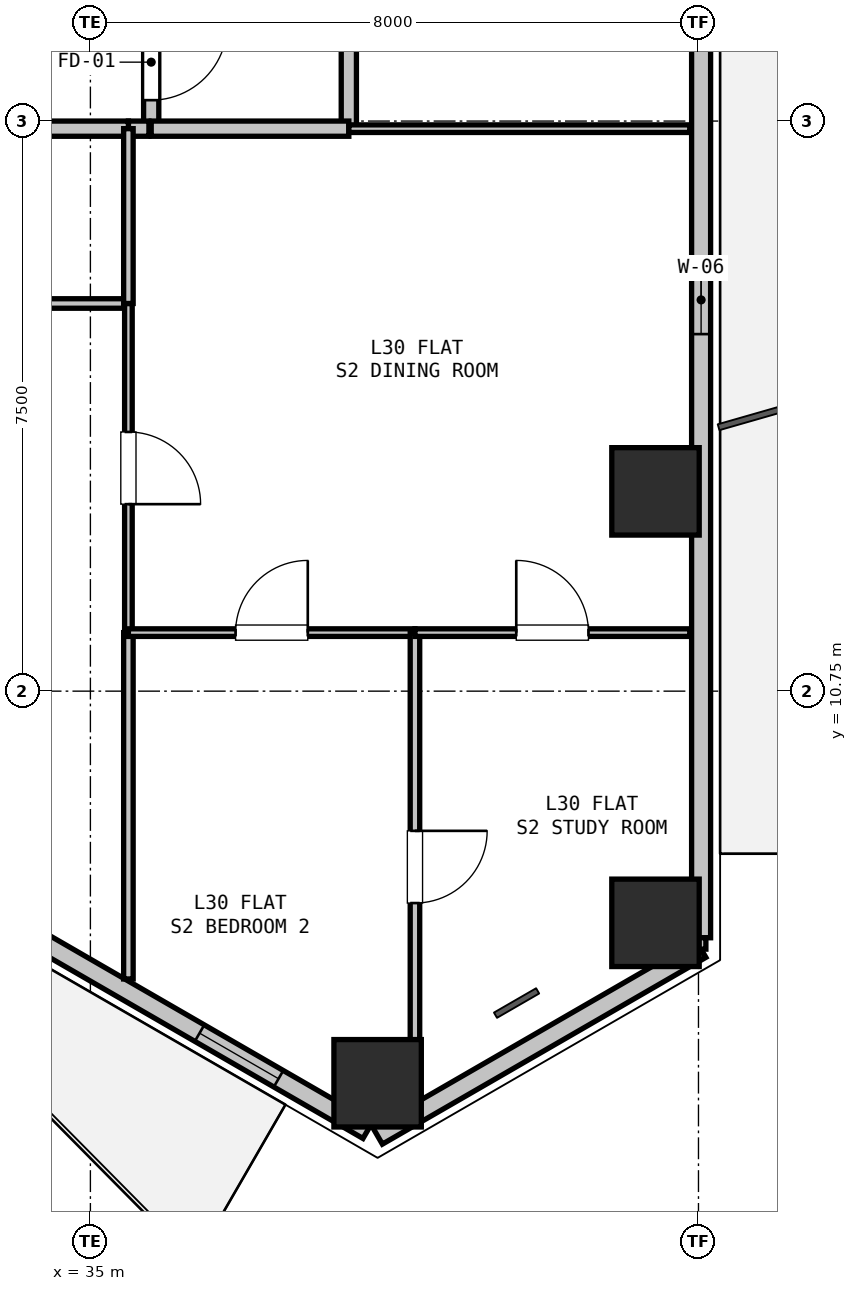
"""IFC4 building model, lengths in metres.
Left out: names, types, materials, properties, quantities, classifications, styles, units other than length and angle.
Written with IfcOpenShell. Run it as: python <this file> out.ifc"""

import sys

from ifc_helpers import new_model, si_unit, direction, frame, frame_2d, origin, origin_2d, place, context, subcontext, project, spatial, rectangle, hollow_rectangle, extrude, element, fill, save


model = new_model("IFC4")
c1 = context("Model", 3, precision=1e-05, world=origin(), true_north=direction((0.0, 1.0)))
c2 = subcontext(c1, "Body", "Model", "MODEL_VIEW")
j1 = project(units=[si_unit("LENGTHUNIT", "METRE"), si_unit("PLANEANGLEUNIT", "RADIAN")], contexts=[c1])
p1 = place(None, origin())
s1 = spatial("IfcSite", under=j1, at=p1, CompositionType="ELEMENT")
p2 = place(p1, origin())
s2 = spatial("IfcBuilding", under=s1, at=p2, CompositionType="ELEMENT")
p3 = place(p2, frame((0.0, 0.0, 109.8)))
s3 = spatial("IfcBuildingStorey", under=s2, at=p3, CompositionType="ELEMENT", Elevation=109.8)
for number, where, z_axis, x_axis in (
    (1, (42.435, 13.378, 0.0), (0.0, 0.0, 1.0), (1.0, 0.0, 0.0)),
    (2, (42.435, 7.702, 0.0), (0.0, 0.0, 1.0), (1.0, 0.0, 0.0)),
    (3, (38.779, 5.591, 0.0), (0.0, 0.0, 1.0), (1.0, 0.0, 0.0)),
):
    element("IfcColumn", number, at=place(p3, frame(where, z_axis=z_axis, x_axis=x_axis)), inside=s3, PredefinedType="COLUMN", context=c2, shape_type="SweptSolid", body=[
        extrude(hollow_rectangle(XDim=1.15, YDim=1.15, WallThickness=0.032, at=origin_2d()), origin(), (0.0, 0.0, 1.0), 3.3),
    ])
p4 = place(p3, frame((43.035, 7.356, 0.0), z_axis=(0.0, 0.0, 1.0), x_axis=(-0.866011848704, -0.500023477353, 0.0)))
e4 = element("IfcWall", 4, at=p4, inside=s3, PredefinedType="SOLIDWALL", context=c2, shape_type="SweptSolid", body=[
    extrude(rectangle(XDim=4.914, YDim=0.25, at=frame_2d((2.457, 0.0))), origin(), (0.0, 0.0, 1.0), 2.67),
])
p5 = place(p3, frame((43.035, 19.435, 0.0), z_axis=(0.0, 0.0, 1.0), x_axis=(0.0, -1.0, 0.0)))
e5 = element("IfcWall", 5, at=p5, inside=s3, PredefinedType="SOLIDWALL", context=c2, shape_type="SweptSolid", body=[
    extrude(rectangle(XDim=11.93, YDim=0.25, at=frame_2d((5.965, 0.0))), origin(), (0.0, 0.0, 1.0), 2.67),
])
p6 = place(p5, frame((3.088, 0.0, 0.9)))
e6 = element("IfcOpeningElement", 6, at=p6, cuts=e5, PredefinedType="OPENING", context=c2, shape_type="SweptSolid", body=[
    extrude(rectangle(XDim=0.9, YDim=1.4, at=frame_2d((0.45, 0.7))), frame((0.0, 0.135, 0.0), z_axis=(0.0, -1.0, 0.0), x_axis=(1.0, 0.0, 0.0)), (0.0, 0.0, 1.0), 0.27),
])
p7 = place(p3, frame((38.649, 4.973, 0.0), z_axis=(0.0, 0.0, 1.0), x_axis=(-0.866023023012, 0.500004123596, 0.0)))
e7 = element("IfcWall", 7, at=p7, inside=s3, PredefinedType="SOLIDWALL", context=c2, shape_type="SweptSolid", body=[
    extrude(rectangle(XDim=11.93, YDim=0.25, at=frame_2d((5.965, 0.0))), origin(), (0.0, 0.0, 1.0), 2.67),
])
p8 = place(p7, frame((7.616, 0.0, 0.0)))
e8 = element("IfcOpeningElement", 8, at=p8, cuts=e7, PredefinedType="OPENING", context=c2, shape_type="SweptSolid", body=[
    extrude(rectangle(XDim=1.0, YDim=2.1, at=frame_2d((0.5, 1.05))), frame((0.0, 0.135, 0.0), z_axis=(0.0, -1.0, 0.0), x_axis=(1.0, 0.0, 0.0)), (0.0, 0.0, 1.0), 0.27),
])
p9 = place(p7, frame((1.355, 0.0, 0.9)))
e9 = element("IfcOpeningElement", 9, at=p9, cuts=e7, PredefinedType="OPENING", context=c2, shape_type="SweptSolid", body=[
    extrude(rectangle(XDim=1.2, YDim=1.4, at=frame_2d((0.6, 0.7))), frame((0.0, 0.135, 0.0), z_axis=(0.0, -1.0, 0.0), x_axis=(1.0, 0.0, 0.0)), (0.0, 0.0, 1.0), 0.27),
])
p10 = place(p3, frame((35.8, 19.9, 0.0), z_axis=(0.0, 0.0, 1.0), x_axis=(0.0, -1.0, 0.0)))
e10 = element("IfcWall", 10, at=p10, inside=s3, PredefinedType="PARTITIONING", context=c2, shape_type="SweptSolid", body=[
    extrude(rectangle(XDim=1.75, YDim=0.2, at=frame_2d((0.875, 0.0))), origin(), (0.0, 0.0, 1.0), 3.05),
])
p11 = place(p10, frame((0.375, 0.0, 0.0)))
e11 = element("IfcOpeningElement", 11, at=p11, cuts=e10, PredefinedType="OPENING", context=c2, shape_type="SweptSolid", body=[
    extrude(rectangle(XDim=1.0, YDim=2.15, at=frame_2d((0.5, 1.075))), frame((0.0, 0.11, 0.0), z_axis=(0.0, -1.0, 0.0), x_axis=(1.0, 0.0, 0.0)), (0.0, 0.0, 1.0), 0.22),
])
p12 = place(p3, frame((35.77, 18.15, 0.0), z_axis=(0.0, 0.0, 1.0), x_axis=(-1.0, 0.0, 0.0)))
e12 = element("IfcWall", 12, at=p12, inside=s3, PredefinedType="PARTITIONING", context=c2, shape_type="SweptSolid", body=[
    extrude(rectangle(XDim=0.27, YDim=0.2, at=frame_2d((0.135, 0.0))), origin(), (0.0, 0.0, 1.0), 3.05),
])
p13 = place(p3, frame((35.5, 18.15, 0.0), z_axis=(0.0, 0.0, 1.0), x_axis=(-1.0, 0.0, 0.0)))
e13 = element("IfcWall", 13, at=p13, inside=s3, PredefinedType="PARTITIONING", context=c2, shape_type="SweptSolid", body=[
    extrude(rectangle(XDim=4.5, YDim=0.2, at=frame_2d((2.25, 0.0))), origin(), (0.0, 0.0, 1.0), 3.05),
])
p14 = place(p3, frame((38.4, 19.9, 0.0), z_axis=(0.0, 0.0, 1.0), x_axis=(0.0, -1.0, 0.0)))
e14 = element("IfcWall", 14, at=p14, inside=s3, PredefinedType="PARTITIONING", context=c2, shape_type="SweptSolid", body=[
    extrude(rectangle(XDim=1.75, YDim=0.2, at=frame_2d((0.875, 0.0))), origin(), (0.0, 0.0, 1.0), 3.05),
])
p15 = place(p3, frame((38.4, 18.15, 0.0), z_axis=(0.0, 0.0, 1.0), x_axis=(-1.0, 0.0, 0.0)))
e15 = element("IfcWall", 15, at=p15, inside=s3, PredefinedType="PARTITIONING", context=c2, shape_type="SweptSolid", body=[
    extrude(rectangle(XDim=2.6, YDim=0.2, at=frame_2d((1.3, 0.0))), origin(), (0.0, 0.0, 1.0), 2.423),
])
p16 = place(p3, frame((31.0, 15.85, 0.0), z_axis=(0.0, 0.0, 1.0), x_axis=(1.0, 0.0, 0.0)))
e16 = element("IfcWall", 16, at=p16, inside=s3, PredefinedType="PARTITIONING", context=c2, shape_type="SweptSolid", body=[
    extrude(rectangle(XDim=4.5, YDim=0.125, at=frame_2d((2.25, 0.0))), origin(), (0.0, 0.0, 1.0), 3.05),
])
p17 = place(p3, frame((35.5, 15.85, 0.0), z_axis=(0.0, 0.0, 1.0), x_axis=(0.0, -1.0, 0.0)))
e17 = element("IfcWall", 17, at=p17, inside=s3, PredefinedType="PARTITIONING", context=c2, shape_type="SweptSolid", body=[
    extrude(rectangle(XDim=4.33, YDim=0.1, at=frame_2d((2.165, 0.0))), origin(), (0.0, 0.0, 1.0), 3.05),
])
p18 = place(p17, frame((1.69, 0.0, 0.0)))
e18 = element("IfcOpeningElement", 18, at=p18, cuts=e17, PredefinedType="OPENING", context=c2, shape_type="SweptSolid", body=[
    extrude(rectangle(XDim=0.95, YDim=2.1, at=frame_2d((0.475, 1.05))), frame((0.0, 0.06, 0.0), z_axis=(0.0, -1.0, 0.0), x_axis=(1.0, 0.0, 0.0)), (0.0, 0.0, 1.0), 0.12),
])
p19 = place(p3, frame((35.5, 11.52, 0.0), z_axis=(0.0, 0.0, 1.0), x_axis=(0.0, -1.0, 0.0)))
e19 = element("IfcWall", 19, at=p19, inside=s3, PredefinedType="PARTITIONING", context=c2, shape_type="SweptSolid", body=[
    extrude(rectangle(XDim=4.557, YDim=0.125, at=frame_2d((2.278, 0.0))), origin(), (0.0, 0.0, 1.0), 2.714),
])
p20 = place(p3, frame((35.5, 11.52, 0.0), z_axis=(0.0, 0.0, 1.0), x_axis=(1.0, 0.0, 0.0)))
e20 = element("IfcWall", 20, at=p20, inside=s3, PredefinedType="PARTITIONING", context=c2, shape_type="SweptSolid", body=[
    extrude(rectangle(XDim=3.77, YDim=0.1, at=frame_2d((1.885, 0.0))), origin(), (0.0, 0.0, 1.0), 3.05),
])
p21 = place(p20, frame((1.41, 0.0, 0.0)))
e21 = element("IfcOpeningElement", 21, at=p21, cuts=e20, PredefinedType="OPENING", context=c2, shape_type="SweptSolid", body=[
    extrude(rectangle(XDim=0.95, YDim=2.1, at=frame_2d((0.475, 1.05))), frame((0.0, 0.06, 0.0), z_axis=(0.0, -1.0, 0.0), x_axis=(1.0, 0.0, 0.0)), (0.0, 0.0, 1.0), 0.12),
])
p22 = place(p3, frame((39.27, 11.52, 0.0), z_axis=(0.0, 0.0, 1.0), x_axis=(0.0, -1.0, 0.0)))
e22 = element("IfcWall", 22, at=p22, inside=s3, PredefinedType="PARTITIONING", context=c2, shape_type="SweptSolid", body=[
    extrude(rectangle(XDim=6.166, YDim=0.125, at=frame_2d((3.083, 0.0))), origin(), (0.0, 0.0, 1.0), 2.714),
])
p23 = place(p22, frame((2.608, 0.0, 0.0)))
e23 = element("IfcOpeningElement", 23, at=p23, cuts=e22, PredefinedType="OPENING", context=c2, shape_type="SweptSolid", body=[
    extrude(rectangle(XDim=0.95, YDim=2.1, at=frame_2d((0.475, 1.05))), frame((0.0, 0.073, 0.0), z_axis=(0.0, -1.0, 0.0), x_axis=(1.0, 0.0, 0.0)), (0.0, 0.0, 1.0), 0.145),
])
p24 = place(p3, frame((39.27, 11.52, 0.0), z_axis=(0.0, 0.0, 1.0), x_axis=(1.0, 0.0, 0.0)))
e24 = element("IfcWall", 24, at=p24, inside=s3, PredefinedType="PARTITIONING", context=c2, shape_type="SweptSolid", body=[
    extrude(rectangle(XDim=3.615, YDim=0.1, at=frame_2d((1.808, 0.0))), origin(), (0.0, 0.0, 1.0), 2.423),
])
p25 = place(p24, frame((1.333, 0.0, 0.0)))
e25 = element("IfcOpeningElement", 25, at=p25, cuts=e24, PredefinedType="OPENING", context=c2, shape_type="SweptSolid", body=[
    extrude(rectangle(XDim=0.95, YDim=2.1, at=frame_2d((0.475, 1.05))), frame((0.0, 0.06, 0.0), z_axis=(0.0, -1.0, 0.0), x_axis=(1.0, 0.0, 0.0)), (0.0, 0.0, 1.0), 0.12),
])
p26 = place(p3, frame((43.035, 7.506, 0.0), z_axis=(0.0, 0.0, 1.0), x_axis=(0.0, -1.0, 0.0)))
e26 = element("IfcWall", 26, at=p26, inside=s3, PredefinedType="PARTITIONING", context=c2, shape_type="SweptSolid", body=[
    extrude(rectangle(XDim=0.15, YDim=0.125, at=frame_2d((0.075, 0.0))), origin(), (0.0, 0.0, 1.0), 3.05),
])
p27 = place(p3, frame((38.4, 18.15, 0.0), z_axis=(0.0, 0.0, 1.0), x_axis=(1.0, 0.0, 0.0)))
e27 = element("IfcWall", 27, at=p27, inside=s3, PredefinedType="PARTITIONING", context=c2, shape_type="SweptSolid", body=[
    extrude(rectangle(XDim=4.486, YDim=0.1, at=frame_2d((2.243, 0.0))), origin(), (0.0, 0.0, 1.0), 2.365),
])
p28 = place(p3, frame((35.5, 15.85, 0.0), z_axis=(0.0, 0.0, 1.0), x_axis=(0.0, 1.0, 0.0)))
e28 = element("IfcWall", 28, at=p28, inside=s3, PredefinedType="PARTITIONING", context=c2, shape_type="SweptSolid", body=[
    extrude(rectangle(XDim=2.3, YDim=0.125, at=frame_2d((1.15, 0.0))), origin(), (0.0, 0.0, 1.0), 3.05),
])
p29 = place(p6, origin())
e29 = element("IfcWindow", 29, at=p29, inside=s3, PartitioningType="SINGLE_PANEL", PredefinedType="WINDOW", context=c2, shape_type="SweptSolid", body=[
    extrude(rectangle(XDim=0.9, YDim=1.4, at=frame_2d((0.45, 0.7))), frame((0.0, 0.03, 0.0), z_axis=(0.0, -1.0, 0.0), x_axis=(1.0, 0.0, 0.0)), (0.0, 0.0, 1.0), 0.06),
])
fill(e6, e29)
p30 = place(p9, origin())
e30 = element("IfcWindow", 30, at=p30, inside=s3, PartitioningType="SINGLE_PANEL", PredefinedType="WINDOW", context=c2, shape_type="SweptSolid", body=[
    extrude(rectangle(XDim=1.2, YDim=1.4, at=frame_2d((0.6, 0.7))), frame((0.0, 0.03, 0.0), z_axis=(0.0, -1.0, 0.0), x_axis=(1.0, 0.0, 0.0)), (0.0, 0.0, 1.0), 0.06),
])
fill(e9, e30)
p31 = place(p11, origin())
e31 = element("IfcDoor", 31, at=p31, inside=s3, OperationType="SINGLE_SWING_LEFT", PredefinedType="DOOR", context=c2, shape_type="SweptSolid", body=[
    extrude(rectangle(XDim=1.0, YDim=2.15, at=frame_2d((0.5, 1.075))), frame((0.0, 0.025, 0.0), z_axis=(0.0, -1.0, 0.0), x_axis=(1.0, 0.0, 0.0)), (0.0, 0.0, 1.0), 0.05),
])
fill(e11, e31)
p32 = place(p18, origin())
e32 = element("IfcDoor", 32, at=p32, inside=s3, OperationType="SINGLE_SWING_RIGHT", PredefinedType="DOOR", context=c2, shape_type="SweptSolid", body=[
    extrude(rectangle(XDim=0.95, YDim=2.1, at=frame_2d((0.475, 1.05))), frame((0.0, 0.025, 0.0), z_axis=(0.0, -1.0, 0.0), x_axis=(1.0, 0.0, 0.0)), (0.0, 0.0, 1.0), 0.05),
])
fill(e18, e32)
p33 = place(p23, origin())
e33 = element("IfcDoor", 33, at=p33, inside=s3, OperationType="SINGLE_SWING_LEFT", PredefinedType="DOOR", context=c2, shape_type="SweptSolid", body=[
    extrude(rectangle(XDim=0.95, YDim=2.1, at=frame_2d((0.475, 1.05))), frame((0.0, 0.025, 0.0), z_axis=(0.0, -1.0, 0.0), x_axis=(1.0, 0.0, 0.0)), (0.0, 0.0, 1.0), 0.05),
])
fill(e23, e33)
p34 = place(p21, origin())
e34 = element("IfcDoor", 34, at=p34, inside=s3, OperationType="SINGLE_SWING_RIGHT", PredefinedType="DOOR", context=c2, shape_type="SweptSolid", body=[
    extrude(rectangle(XDim=0.95, YDim=2.1, at=frame_2d((0.475, 1.05))), frame((0.0, 0.025, 0.0), z_axis=(0.0, -1.0, 0.0), x_axis=(1.0, 0.0, 0.0)), (0.0, 0.0, 1.0), 0.05),
])
fill(e21, e34)
p35 = place(p25, origin())
e35 = element("IfcDoor", 35, at=p35, inside=s3, OperationType="SINGLE_SWING_LEFT", PredefinedType="DOOR", context=c2, shape_type="SweptSolid", body=[
    extrude(rectangle(XDim=0.95, YDim=2.1, at=frame_2d((0.475, 1.05))), frame((0.0, 0.025, 0.0), z_axis=(0.0, -1.0, 0.0), x_axis=(1.0, 0.0, 0.0)), (0.0, 0.0, 1.0), 0.05),
])
fill(e25, e35)
save(model, sys.argv[1])
